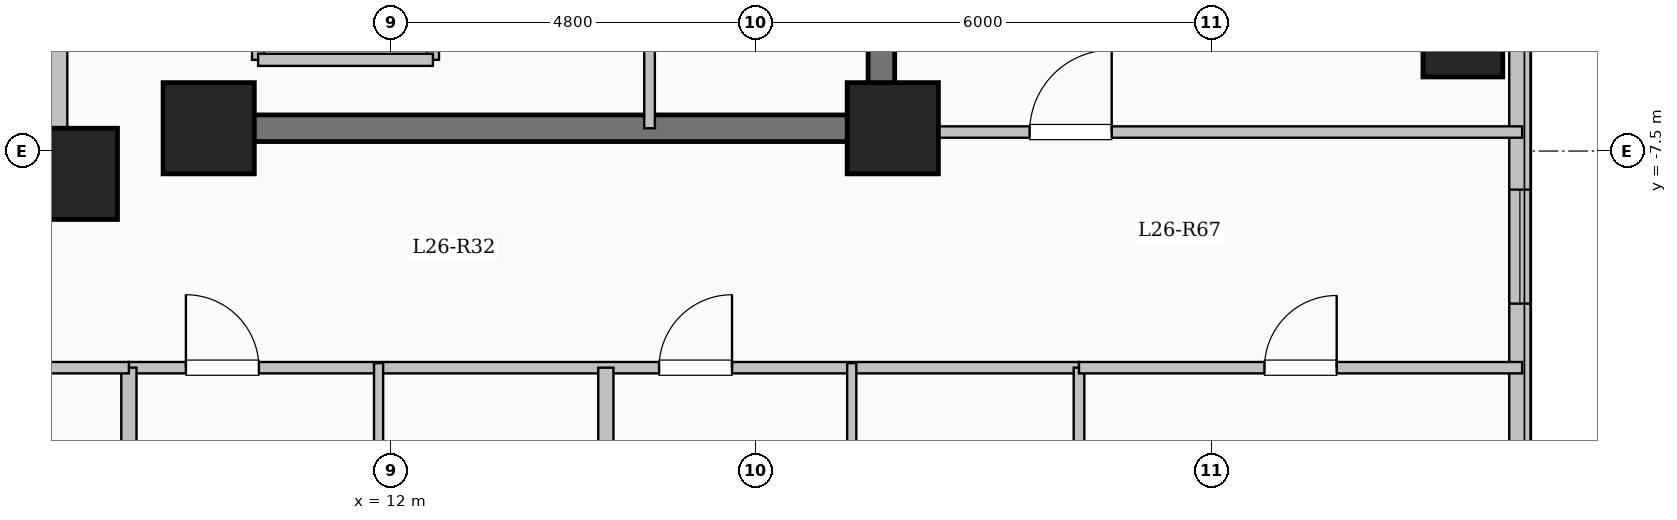
"""IFC4 building model, lengths in metres.
Left out: names, types, materials, properties, quantities, classifications, styles, units other than length and angle.
Written with IfcOpenShell. Run it as: python <this file> out.ifc"""

import sys

from ifc_helpers import new_model, si_unit, direction, frame, frame_2d, origin, origin_2d, place, context, subcontext, project, spatial, rectangle, extrude, element, fill, save


model = new_model("IFC4")
c1 = context("Model", 3, precision=1e-05, world=origin(), true_north=direction((0.0, 1.0)))
c2 = subcontext(c1, "Body", "Model", "MODEL_VIEW")
j1 = project(units=[si_unit("LENGTHUNIT", "METRE"), si_unit("PLANEANGLEUNIT", "RADIAN")], contexts=[c1])
p1 = place(None, origin())
s1 = spatial("IfcSite", under=j1, at=p1, CompositionType="ELEMENT")
p2 = place(p1, origin())
s2 = spatial("IfcBuilding", under=s1, at=p2, CompositionType="ELEMENT")
p3 = place(p2, frame((0.0, 0.0, 98.4)))
s3 = spatial("IfcBuildingStorey", under=s2, at=p3, CompositionType="ELEMENT", Elevation=98.4)
for number, where, z_axis, x_axis in (
    (1, (7.8, -7.8, 0.0), (0.0, 0.0, 1.0), (1.0, 0.0, 0.0)),
    (2, (9.6, -7.2, 0.0), (0.0, 0.0, 1.0), (1.0, 0.0, 0.0)),
    (3, (18.6, -7.2, 0.0), (0.0, 0.0, 1.0), (1.0, 0.0, 0.0)),
):
    element("IfcColumn", number, at=place(p3, frame(where, z_axis=z_axis, x_axis=x_axis)), inside=s3, PredefinedType="COLUMN", context=c2, shape_type="SweptSolid", body=[
        extrude(rectangle(XDim=1.2, YDim=1.2, at=origin_2d()), origin(), (0.0, 0.0, 1.0), 3.35),
    ])
p4 = place(p3, frame((26.1, -6.0, 0.0), z_axis=(0.0, 0.0, 1.0), x_axis=(1.0, 0.0, 0.0)))
e4 = element("IfcColumn", 4, at=p4, inside=s3, PredefinedType="COLUMN", context=c2, shape_type="SweptSolid", body=[
    extrude(rectangle(XDim=1.05, YDim=1.05, at=origin_2d()), origin(), (0.0, 0.0, 1.0), 3.35),
])
p5 = place(p3, frame((-7.62, -7.62, 0.0), z_axis=(0.0, 0.0, 1.0), x_axis=(1.0, 0.0, 0.0)))
e5 = element("IfcWall", 5, at=p5, inside=s3, PredefinedType="SOLIDWALL", context=c2, shape_type="SweptSolid", body=[
    extrude(rectangle(XDim=15.24, YDim=0.24, at=frame_2d((7.62, 0.0))), origin(), (0.0, 0.0, 1.0), 3.1),
])
p6 = place(p5, frame((6.92, 0.0, 0.95)))
e6 = element("IfcOpeningElement", 6, at=p6, cuts=e5, PredefinedType="OPENING", context=c2, shape_type="SweptSolid", body=[
    extrude(rectangle(XDim=1.4, YDim=1.5, at=frame_2d((0.7, 0.75))), frame((0.0, 0.13, 0.0), z_axis=(0.0, -1.0, 0.0), x_axis=(1.0, 0.0, 0.0)), (0.0, 0.0, 1.0), 0.26),
])
p7 = place(p3, frame((7.62, -7.62, 0.0), z_axis=(0.0, 0.0, 1.0), x_axis=(0.0, 1.0, 0.0)))
e7 = element("IfcWall", 7, at=p7, inside=s3, PredefinedType="SOLIDWALL", context=c2, shape_type="SweptSolid", body=[
    extrude(rectangle(XDim=15.24, YDim=0.24, at=frame_2d((7.62, 0.0))), origin(), (0.0, 0.0, 1.0), 3.1),
])
p8 = place(p7, frame((6.92, 0.0, 0.95)))
e8 = element("IfcOpeningElement", 8, at=p8, cuts=e7, PredefinedType="OPENING", context=c2, shape_type="SweptSolid", body=[
    extrude(rectangle(XDim=1.4, YDim=1.5, at=frame_2d((0.7, 0.75))), frame((0.0, 0.13, 0.0), z_axis=(0.0, -1.0, 0.0), x_axis=(1.0, 0.0, 0.0)), (0.0, 0.0, 1.0), 0.26),
])
p9 = place(p3, frame((26.85, 17.85, 0.0), z_axis=(0.0, 0.0, 1.0), x_axis=(0.0, -1.0, 0.0)))
e9 = element("IfcWall", 9, at=p9, inside=s3, PredefinedType="SOLIDWALL", context=c2, shape_type="SweptSolid", body=[
    extrude(rectangle(XDim=35.7, YDim=0.28, at=frame_2d((17.85, 0.0))), origin(), (0.0, 0.0, 1.0), 3.1),
])
p10 = place(p9, frame((1.675, 0.0, 0.9)))
e10 = element("IfcOpeningElement", 10, at=p10, cuts=e9, PredefinedType="OPENING", context=c2, shape_type="SweptSolid", body=[
    extrude(rectangle(XDim=2.0, YDim=1.7, at=frame_2d((1.0, 0.85))), frame((0.0, 0.15, 0.0), z_axis=(0.0, -1.0, 0.0), x_axis=(1.0, 0.0, 0.0)), (0.0, 0.0, 1.0), 0.3),
])
p11 = place(p9, frame((5.725, 0.0, 0.95)))
e11 = element("IfcOpeningElement", 11, at=p11, cuts=e9, PredefinedType="OPENING", context=c2, shape_type="SweptSolid", body=[
    extrude(rectangle(XDim=1.0, YDim=1.5, at=frame_2d((0.5, 0.75))), frame((0.0, 0.15, 0.0), z_axis=(0.0, -1.0, 0.0), x_axis=(1.0, 0.0, 0.0)), (0.0, 0.0, 1.0), 0.3),
])
p12 = place(p9, frame((15.1, 0.0, 0.9)))
e12 = element("IfcOpeningElement", 12, at=p12, cuts=e9, PredefinedType="OPENING", context=c2, shape_type="SweptSolid", body=[
    extrude(rectangle(XDim=2.0, YDim=1.7, at=frame_2d((1.0, 0.85))), frame((0.0, 0.15, 0.0), z_axis=(0.0, -1.0, 0.0), x_axis=(1.0, 0.0, 0.0)), (0.0, 0.0, 1.0), 0.3),
])
p13 = place(p9, frame((25.857, 0.0, 0.9)))
e13 = element("IfcOpeningElement", 13, at=p13, cuts=e9, PredefinedType="OPENING", context=c2, shape_type="SweptSolid", body=[
    extrude(rectangle(XDim=1.5, YDim=1.65, at=frame_2d((0.75, 0.825))), frame((0.0, 0.15, 0.0), z_axis=(0.0, -1.0, 0.0), x_axis=(1.0, 0.0, 0.0)), (0.0, 0.0, 1.0), 0.3),
])
p14 = place(p9, frame((30.75, 0.0, 0.9)))
e14 = element("IfcOpeningElement", 14, at=p14, cuts=e9, PredefinedType="OPENING", context=c2, shape_type="SweptSolid", body=[
    extrude(rectangle(XDim=2.4, YDim=1.8, at=frame_2d((1.2, 0.9))), frame((0.0, 0.15, 0.0), z_axis=(0.0, -1.0, 0.0), x_axis=(1.0, 0.0, 0.0)), (0.0, 0.0, 1.0), 0.3),
])
p15 = place(p3, frame((10.25, -6.3, 0.0), z_axis=(0.0, 0.0, 1.0), x_axis=(0.0, 1.0, 0.0)))
e15 = element("IfcWall", 15, at=p15, inside=s3, PredefinedType="SOLIDWALL", context=c2, shape_type="SweptSolid", body=[
    extrude(rectangle(XDim=2.6, YDim=0.16, at=frame_2d((1.3, 0.0))), origin(), (0.0, 0.0, 1.0), 3.1),
])
p16 = place(p15, frame((0.75, 0.0, 0.0)))
e16 = element("IfcOpeningElement", 16, at=p16, cuts=e15, PredefinedType="OPENING", context=c2, shape_type="SweptSolid", body=[
    extrude(rectangle(XDim=1.1, YDim=2.15, at=frame_2d((0.55, 1.075))), frame((0.0, 0.09, 0.0), z_axis=(0.0, -1.0, 0.0), x_axis=(1.0, 0.0, 0.0)), (0.0, 0.0, 1.0), 0.18),
])
p17 = place(p3, frame((12.55, -6.3, 0.0), z_axis=(0.0, 0.0, 1.0), x_axis=(0.0, 1.0, 0.0)))
e17 = element("IfcWall", 17, at=p17, inside=s3, PredefinedType="SOLIDWALL", context=c2, shape_type="SweptSolid", body=[
    extrude(rectangle(XDim=2.6, YDim=0.16, at=frame_2d((1.3, 0.0))), origin(), (0.0, 0.0, 1.0), 3.1),
])
p18 = place(p3, frame((10.25, -6.3, 0.0), z_axis=(0.0, 0.0, 1.0), x_axis=(1.0, 0.0, 0.0)))
e18 = element("IfcWall", 18, at=p18, inside=s3, PredefinedType="SOLIDWALL", context=c2, shape_type="SweptSolid", body=[
    extrude(rectangle(XDim=2.3, YDim=0.16, at=frame_2d((1.15, 0.0))), origin(), (0.0, 0.0, 1.0), 3.1),
])
p19 = place(p3, frame((18.45, -7.375, 0.0), z_axis=(0.0, 0.0, 1.0), x_axis=(0.0, 1.0, 0.0)))
e19 = element("IfcWall", 19, at=p19, inside=s3, PredefinedType="SHEAR", context=c2, shape_type="SweptSolid", body=[
    extrude(rectangle(XDim=14.05, YDim=0.35, at=frame_2d((7.025, 0.0))), origin(), (0.0, 0.0, 1.0), 3.35),
])
p20 = place(p3, frame((10.075, -7.2, 0.0), z_axis=(0.0, 0.0, 1.0), x_axis=(1.0, 0.0, 0.0)))
e20 = element("IfcWall", 20, at=p20, inside=s3, PredefinedType="SHEAR", context=c2, shape_type="SweptSolid", body=[
    extrude(rectangle(XDim=8.55, YDim=0.35, at=frame_2d((4.275, 0.0))), origin(), (0.0, 0.0, 1.0), 3.35),
])
p21 = place(p3, frame((15.4, -7.2, 0.0), z_axis=(0.0, 0.0, 1.0), x_axis=(0.0, 1.0, 0.0)))
e21 = element("IfcWall", 21, at=p21, inside=s3, PredefinedType="PARTITIONING", context=c2, shape_type="SweptSolid", body=[
    extrude(rectangle(XDim=10.45, YDim=0.14, at=frame_2d((5.225, 0.0))), origin(), (0.0, 0.0, 1.0), 3.1),
])
p22 = place(p21, frame((9.25, 0.0, 0.0)))
e22 = element("IfcOpeningElement", 22, at=p22, cuts=e21, PredefinedType="OPENING", context=c2, shape_type="SweptSolid", body=[
    extrude(rectangle(XDim=0.9, YDim=2.08, at=frame_2d((0.45, 1.04))), frame((0.0, 0.08, 0.0), z_axis=(0.0, -1.0, 0.0), x_axis=(1.0, 0.0, 0.0)), (0.0, 0.0, 1.0), 0.16),
])
p23 = place(p3, frame((8.55, -10.35, 0.0), z_axis=(0.0, 0.0, 1.0), x_axis=(1.0, 0.0, 0.0)))
e23 = element("IfcWall", 23, at=p23, inside=s3, PredefinedType="PARTITIONING", context=c2, shape_type="SweptSolid", body=[
    extrude(rectangle(XDim=12.5, YDim=0.15, at=frame_2d((6.25, 0.0))), origin(), (0.0, 0.0, 1.0), 3.1),
])
p24 = place(p23, frame((0.75, 0.0, 0.0)))
e24 = element("IfcOpeningElement", 24, at=p24, cuts=e23, PredefinedType="OPENING", context=c2, shape_type="SweptSolid", body=[
    extrude(rectangle(XDim=0.96, YDim=2.15, at=frame_2d((0.48, 1.075))), frame((0.0, 0.085, 0.0), z_axis=(0.0, -1.0, 0.0), x_axis=(1.0, 0.0, 0.0)), (0.0, 0.0, 1.0), 0.17),
])
p25 = place(p23, frame((6.975, 0.0, 0.0)))
e25 = element("IfcOpeningElement", 25, at=p25, cuts=e23, PredefinedType="OPENING", context=c2, shape_type="SweptSolid", body=[
    extrude(rectangle(XDim=0.96, YDim=2.15, at=frame_2d((0.48, 1.075))), frame((0.0, 0.085, 0.0), z_axis=(0.0, -1.0, 0.0), x_axis=(1.0, 0.0, 0.0)), (0.0, 0.0, 1.0), 0.17),
])
p26 = place(p3, frame((14.825, -22.1, 0.0), z_axis=(0.0, 0.0, 1.0), x_axis=(0.0, 1.0, 0.0)))
e26 = element("IfcWall", 26, at=p26, inside=s3, PredefinedType="SOLIDWALL", context=c2, shape_type="SweptSolid", body=[
    extrude(rectangle(XDim=11.75, YDim=0.2, at=frame_2d((5.875, 0.0))), origin(), (0.0, 0.0, 1.0), 2.435),
])
p27 = place(p3, frame((11.835, -13.51, 0.0), z_axis=(0.0, 0.0, 1.0), x_axis=(0.0, 1.0, 0.0)))
e27 = element("IfcWall", 27, at=p27, inside=s3, PredefinedType="PARTITIONING", context=c2, shape_type="SweptSolid", body=[
    extrude(rectangle(XDim=3.22, YDim=0.12, at=frame_2d((1.61, 0.0))), origin(), (0.0, 0.0, 1.0), 3.1),
])
p28 = place(p27, frame((1.14, 0.0, 0.0)))
e28 = element("IfcOpeningElement", 28, at=p28, cuts=e27, PredefinedType="OPENING", context=c2, shape_type="SweptSolid", body=[
    extrude(rectangle(XDim=0.88, YDim=2.1, at=frame_2d((0.44, 1.05))), frame((0.0, 0.07, 0.0), z_axis=(0.0, -1.0, 0.0), x_axis=(1.0, 0.0, 0.0)), (0.0, 0.0, 1.0), 0.14),
])
p29 = place(p3, frame((18.06, -13.51, 0.0), z_axis=(0.0, 0.0, 1.0), x_axis=(0.0, 1.0, 0.0)))
e29 = element("IfcWall", 29, at=p29, inside=s3, PredefinedType="PARTITIONING", context=c2, shape_type="SweptSolid", body=[
    extrude(rectangle(XDim=3.22, YDim=0.12, at=frame_2d((1.61, 0.0))), origin(), (0.0, 0.0, 1.0), 3.1),
])
p30 = place(p29, frame((1.14, 0.0, 0.0)))
e30 = element("IfcOpeningElement", 30, at=p30, cuts=e29, PredefinedType="OPENING", context=c2, shape_type="SweptSolid", body=[
    extrude(rectangle(XDim=0.88, YDim=2.1, at=frame_2d((0.44, 1.05))), frame((0.0, 0.07, 0.0), z_axis=(0.0, -1.0, 0.0), x_axis=(1.0, 0.0, 0.0)), (0.0, 0.0, 1.0), 0.14),
])
p31 = place(p3, frame((8.55, -22.704, 0.0), z_axis=(0.0, 0.0, 1.0), x_axis=(0.0, 1.0, 0.0)))
e31 = element("IfcWall", 31, at=p31, inside=s3, PredefinedType="SOLIDWALL", context=c2, shape_type="SweptSolid", body=[
    extrude(rectangle(XDim=12.354, YDim=0.2, at=frame_2d((6.177, 0.0))), origin(), (0.0, 0.0, 1.0), 3.1),
])
p32 = place(p3, frame((-8.55, -10.35, 0.0), z_axis=(0.0, 0.0, 1.0), x_axis=(1.0, 0.0, 0.0)))
e32 = element("IfcWall", 32, at=p32, inside=s3, PredefinedType="PARTITIONING", context=c2, shape_type="SweptSolid", body=[
    extrude(rectangle(XDim=17.1, YDim=0.15, at=frame_2d((8.55, 0.0))), origin(), (0.0, 0.0, 1.0), 3.1),
])
p33 = place(p32, frame((1.6, 0.0, 0.0)))
e33 = element("IfcOpeningElement", 33, at=p33, cuts=e32, PredefinedType="OPENING", context=c2, shape_type="SweptSolid", body=[
    extrude(rectangle(XDim=0.95, YDim=2.15, at=frame_2d((0.475, 1.075))), frame((0.0, 0.085, 0.0), z_axis=(0.0, -1.0, 0.0), x_axis=(1.0, 0.0, 0.0)), (0.0, 0.0, 1.0), 0.17),
])
p34 = place(p32, frame((10.5, 0.0, 0.0)))
e34 = element("IfcOpeningElement", 34, at=p34, cuts=e32, PredefinedType="OPENING", context=c2, shape_type="SweptSolid", body=[
    extrude(rectangle(XDim=0.95, YDim=2.15, at=frame_2d((0.475, 1.075))), frame((0.0, 0.085, 0.0), z_axis=(0.0, -1.0, 0.0), x_axis=(1.0, 0.0, 0.0)), (0.0, 0.0, 1.0), 0.17),
])
p35 = place(p3, frame((18.45, -7.25, 0.0), z_axis=(0.0, 0.0, 1.0), x_axis=(1.0, 0.0, 0.0)))
e35 = element("IfcWall", 35, at=p35, inside=s3, PredefinedType="PARTITIONING", context=c2, shape_type="SweptSolid", body=[
    extrude(rectangle(XDim=8.43, YDim=0.15, at=frame_2d((4.215, 0.0))), origin(), (0.0, 0.0, 1.0), 3.1),
])
p36 = place(p35, frame((1.95, 0.0, 0.0)))
e36 = element("IfcOpeningElement", 36, at=p36, cuts=e35, PredefinedType="OPENING", context=c2, shape_type="SweptSolid", body=[
    extrude(rectangle(XDim=1.08, YDim=2.15, at=frame_2d((0.54, 1.075))), frame((0.0, 0.085, 0.0), z_axis=(0.0, -1.0, 0.0), x_axis=(1.0, 0.0, 0.0)), (0.0, 0.0, 1.0), 0.17),
])
p37 = place(p3, frame((21.05, -17.85, 0.0), z_axis=(0.0, 0.0, 1.0), x_axis=(0.0, 1.0, 0.0)))
e37 = element("IfcWall", 37, at=p37, inside=s3, PredefinedType="PARTITIONING", context=c2, shape_type="SweptSolid", body=[
    extrude(rectangle(XDim=7.5, YDim=0.14, at=frame_2d((3.75, 0.0))), origin(), (0.0, 0.0, 1.0), 3.1),
])
p38 = place(p3, frame((21.05, -10.35, 0.0), z_axis=(0.0, 0.0, 1.0), x_axis=(1.0, 0.0, 0.0)))
e38 = element("IfcWall", 38, at=p38, inside=s3, PredefinedType="PARTITIONING", context=c2, shape_type="SweptSolid", body=[
    extrude(rectangle(XDim=5.83, YDim=0.15, at=frame_2d((2.915, 0.0))), origin(), (0.0, 0.0, 1.0), 3.1),
])
p39 = place(p38, frame((2.44, 0.0, 0.0)))
e39 = element("IfcOpeningElement", 39, at=p39, cuts=e38, PredefinedType="OPENING", context=c2, shape_type="SweptSolid", body=[
    extrude(rectangle(XDim=0.95, YDim=2.15, at=frame_2d((0.475, 1.075))), frame((0.0, 0.085, 0.0), z_axis=(0.0, -1.0, 0.0), x_axis=(1.0, 0.0, 0.0)), (0.0, 0.0, 1.0), 0.17),
])
p40 = place(p13, origin())
e40 = element("IfcWindow", 40, at=p40, inside=s3, PartitioningType="SINGLE_PANEL", PredefinedType="WINDOW", context=c2, shape_type="SweptSolid", body=[
    extrude(rectangle(XDim=1.5, YDim=1.65, at=frame_2d((0.75, 0.825))), frame((0.0, 0.03, 0.0), z_axis=(0.0, -1.0, 0.0), x_axis=(1.0, 0.0, 0.0)), (0.0, 0.0, 1.0), 0.06),
])
fill(e13, e40)
p41 = place(p24, origin())
e41 = element("IfcDoor", 41, at=p41, inside=s3, OperationType="SINGLE_SWING_LEFT", PredefinedType="DOOR", context=c2, shape_type="SweptSolid", body=[
    extrude(rectangle(XDim=0.96, YDim=2.15, at=frame_2d((0.48, 1.075))), frame((0.0, 0.025, 0.0), z_axis=(0.0, -1.0, 0.0), x_axis=(1.0, 0.0, 0.0)), (0.0, 0.0, 1.0), 0.05),
])
fill(e24, e41)
p42 = place(p25, origin())
e42 = element("IfcDoor", 42, at=p42, inside=s3, OperationType="SINGLE_SWING_RIGHT", PredefinedType="DOOR", context=c2, shape_type="SweptSolid", body=[
    extrude(rectangle(XDim=0.96, YDim=2.15, at=frame_2d((0.48, 1.075))), frame((0.0, 0.025, 0.0), z_axis=(0.0, -1.0, 0.0), x_axis=(1.0, 0.0, 0.0)), (0.0, 0.0, 1.0), 0.05),
])
fill(e25, e42)
p43 = place(p39, origin())
e43 = element("IfcDoor", 43, at=p43, inside=s3, OperationType="SINGLE_SWING_RIGHT", PredefinedType="DOOR", context=c2, shape_type="SweptSolid", body=[
    extrude(rectangle(XDim=0.95, YDim=2.15, at=frame_2d((0.475, 1.075))), frame((0.0, 0.025, 0.0), z_axis=(0.0, -1.0, 0.0), x_axis=(1.0, 0.0, 0.0)), (0.0, 0.0, 1.0), 0.05),
])
fill(e39, e43)
p44 = place(p36, origin())
e44 = element("IfcDoor", 44, at=p44, inside=s3, OperationType="SINGLE_SWING_RIGHT", PredefinedType="DOOR", context=c2, shape_type="SweptSolid", body=[
    extrude(rectangle(XDim=1.08, YDim=2.15, at=frame_2d((0.54, 1.075))), frame((0.0, 0.025, 0.0), z_axis=(0.0, -1.0, 0.0), x_axis=(1.0, 0.0, 0.0)), (0.0, 0.0, 1.0), 0.05),
])
fill(e36, e44)
save(model, sys.argv[1])
